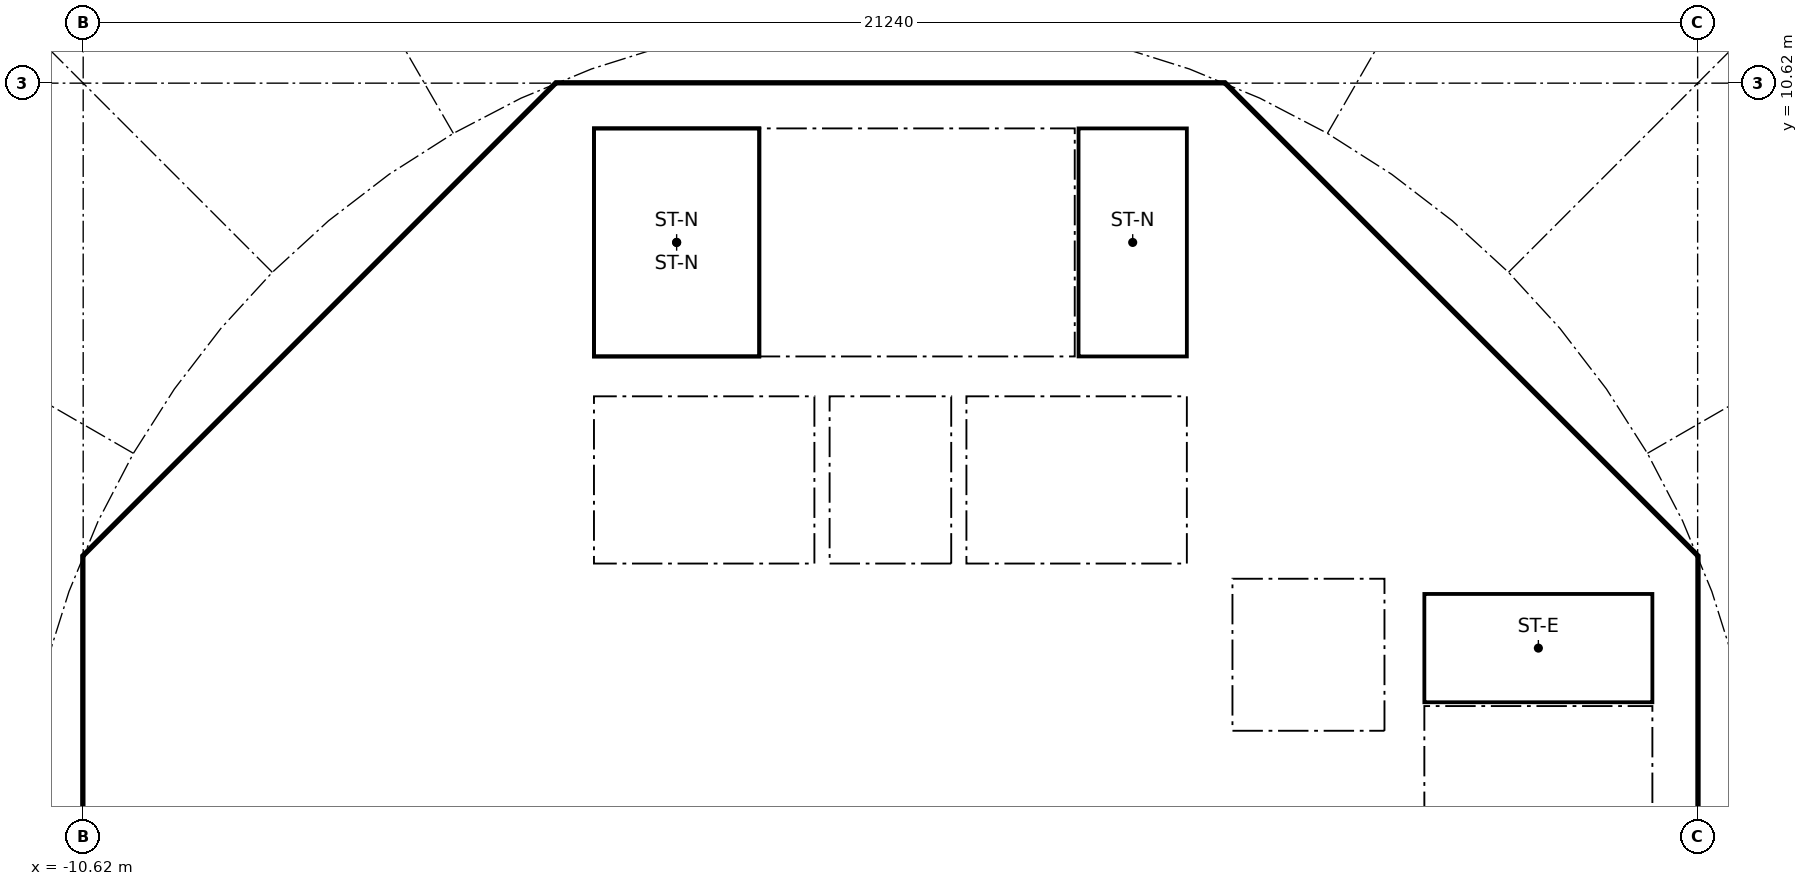
"""IFC4 building model, lengths in metres.
Left out: names, types, materials, properties, quantities, classifications, styles, units other than length and angle.
Written with IfcOpenShell. Run it as: python <this file> out.ifc"""

import sys

from ifc_helpers import new_model, si_unit, direction, frame, frame_2d, origin, place, context, subcontext, project, spatial, polyline, rectangle, outline, extrude, element, fill, save


model = new_model("IFC4")
c1 = context("Model", 3, precision=1e-05, world=origin(), true_north=direction((0.0, 1.0)))
c2 = subcontext(c1, "Body", "Model", "MODEL_VIEW")
j1 = project(units=[si_unit("LENGTHUNIT", "METRE"), si_unit("PLANEANGLEUNIT", "RADIAN")], contexts=[c1])
p1 = place(None, origin())
s1 = spatial("IfcSite", under=j1, at=p1, CompositionType="ELEMENT")
p2 = place(p1, origin())
s2 = spatial("IfcBuilding", under=s1, at=p2, CompositionType="ELEMENT")
p3 = place(p2, frame((0.0, 0.0, 299.2)))
s3 = spatial("IfcBuildingStorey", under=s2, at=p3, CompositionType="ELEMENT", Elevation=299.2)
p4 = place(p3, frame((9.988, 4.613, 0.0), z_axis=(0.0, 0.0, 1.0), x_axis=(-0.707106781187, 0.707106781187, 0.0)))
e1 = element("IfcWall", 1, at=p4, inside=s3, PredefinedType="SHEAR", context=c2, shape_type="SweptSolid", body=[
    extrude(rectangle(XDim=7.602, YDim=0.6, at=frame_2d((3.801, 0.0))), origin(), (0.0, 0.0, 1.0), 10.75),
])
p5 = place(p4, frame((3.201, 0.0, 0.0)))
e2 = element("IfcOpeningElement", 2, at=p5, cuts=e1, PredefinedType="OPENING", context=c2, shape_type="SweptSolid", body=[
    extrude(rectangle(XDim=1.2, YDim=2.1, at=frame_2d((0.6, 1.05))), frame((0.0, 0.31, 0.0), z_axis=(0.0, -1.0, 0.0), x_axis=(1.0, 0.0, 0.0)), (0.0, 0.0, 1.0), 0.62),
])
p6 = place(p3, frame((-4.613, 9.988, 0.0), z_axis=(0.0, 0.0, 1.0), x_axis=(-0.707106781187, -0.707106781187, 0.0)))
e3 = element("IfcWall", 3, at=p6, inside=s3, PredefinedType="SHEAR", context=c2, shape_type="SweptSolid", body=[
    extrude(rectangle(XDim=7.602, YDim=0.6, at=frame_2d((3.801, 0.0))), origin(), (0.0, 0.0, 1.0), 10.75),
])
p7 = place(p6, frame((0.351, 0.0, 0.0)))
e4 = element("IfcOpeningElement", 4, at=p7, cuts=e3, PredefinedType="OPENING", context=c2, shape_type="SweptSolid", body=[
    extrude(rectangle(XDim=1.1, YDim=2.1, at=frame_2d((0.55, 1.05))), frame((0.0, 0.31, 0.0), z_axis=(0.0, -1.0, 0.0), x_axis=(1.0, 0.0, 0.0)), (0.0, 0.0, 1.0), 0.62),
])
p8 = place(p3, frame((-10.325, 3.801, 0.0), z_axis=(0.0, 0.0, 1.0), x_axis=(0.0, -1.0, 0.0)))
e5 = element("IfcWall", 5, at=p8, inside=s3, PredefinedType="SHEAR", context=c2, shape_type="SweptSolid", body=[
    extrude(rectangle(XDim=7.602, YDim=0.6, at=frame_2d((3.801, 0.0))), origin(), (0.0, 0.0, 1.0), 10.75),
])
p9 = place(p8, frame((0.651, 0.0, 0.0)))
e6 = element("IfcOpeningElement", 6, at=p9, cuts=e5, PredefinedType="OPENING", context=c2, shape_type="SweptSolid", body=[
    extrude(rectangle(XDim=1.5, YDim=2.1, at=frame_2d((0.75, 1.05))), frame((0.0, 0.31, 0.0), z_axis=(0.0, -1.0, 0.0), x_axis=(1.0, 0.0, 0.0)), (0.0, 0.0, 1.0), 0.62),
])
p10 = place(p8, frame((5.451, 0.0, 0.0)))
e7 = element("IfcOpeningElement", 7, at=p10, cuts=e5, PredefinedType="OPENING", context=c2, shape_type="SweptSolid", body=[
    extrude(rectangle(XDim=1.5, YDim=2.1, at=frame_2d((0.75, 1.05))), frame((0.0, 0.31, 0.0), z_axis=(0.0, -1.0, 0.0), x_axis=(1.0, 0.0, 0.0)), (0.0, 0.0, 1.0), 0.62),
])
p11 = place(p3, frame((-7.0, 4.1, 0.0), z_axis=(0.0, 0.0, 1.0), x_axis=(0.0, 1.0, 0.0)))
e8 = element("IfcWall", 8, at=p11, inside=s3, PredefinedType="PARTITIONING", context=c2, shape_type="SweptSolid", body=[
    extrude(rectangle(XDim=2.927, YDim=0.15, at=frame_2d((1.463, 0.0))), origin(), (0.0, 0.0, 1.0), 10.75),
])
p12 = place(p11, frame((1.051, 0.0, 0.0)))
e9 = element("IfcOpeningElement", 9, at=p12, cuts=e8, PredefinedType="OPENING", context=c2, shape_type="SweptSolid", body=[
    extrude(rectangle(XDim=0.9, YDim=2.1, at=frame_2d((0.45, 1.05))), frame((0.0, 0.085, 0.0), z_axis=(0.0, -1.0, 0.0), x_axis=(1.0, 0.0, 0.0)), (0.0, 0.0, 1.0), 0.17),
])
p13 = place(p3, frame((4.0, 4.3, 0.0), z_axis=(0.0, 0.0, 1.0), x_axis=(0.0, 1.0, 0.0)))
e10 = element("IfcWall", 10, at=p13, inside=s3, PredefinedType="SOLIDWALL", context=c2, shape_type="SweptSolid", body=[
    extrude(rectangle(XDim=2.2, YDim=0.2, at=frame_2d((1.1, 0.0))), origin(), (0.0, 0.0, 1.0), 10.75),
])
p14 = place(p13, frame((0.55, 0.0, 0.0)))
e11 = element("IfcOpeningElement", 11, at=p14, cuts=e10, PredefinedType="OPENING", context=c2, shape_type="SweptSolid", body=[
    extrude(rectangle(XDim=1.1, YDim=2.1, at=frame_2d((0.55, 1.05))), frame((0.0, 0.11, 0.0), z_axis=(0.0, -1.0, 0.0), x_axis=(1.0, 0.0, 0.0)), (0.0, 0.0, 1.0), 0.22),
])
p15 = place(p3, frame((-4.0, 4.3, 0.0), z_axis=(0.0, 0.0, 1.0), x_axis=(0.0, 1.0, 0.0)))
e12 = element("IfcWall", 12, at=p15, inside=s3, PredefinedType="SOLIDWALL", context=c2, shape_type="SweptSolid", body=[
    extrude(rectangle(XDim=2.2, YDim=0.2, at=frame_2d((1.1, 0.0))), origin(), (0.0, 0.0, 1.0), 10.75),
])
p16 = place(p15, frame((0.55, 0.0, 0.0)))
e13 = element("IfcOpeningElement", 13, at=p16, cuts=e12, PredefinedType="OPENING", context=c2, shape_type="SweptSolid", body=[
    extrude(rectangle(XDim=1.1, YDim=2.1, at=frame_2d((0.55, 1.05))), frame((0.0, 0.11, 0.0), z_axis=(0.0, -1.0, 0.0), x_axis=(1.0, 0.0, 0.0)), (0.0, 0.0, 1.0), 0.22),
])
p17 = place(p3, frame((-6.7, 2.0, 0.0), z_axis=(0.0, 0.0, 1.0), x_axis=(1.0, 0.0, 0.0)))
e14 = element("IfcWall", 14, at=p17, inside=s3, PredefinedType="SOLIDWALL", context=c2, shape_type="SweptSolid", body=[
    extrude(rectangle(XDim=13.4, YDim=0.2, at=frame_2d((6.7, 0.0))), origin(), (0.0, 0.0, 1.0), 10.75),
])
p18 = place(p17, frame((11.65, 0.0, 0.0)))
e15 = element("IfcOpeningElement", 15, at=p18, cuts=e14, PredefinedType="OPENING", context=c2, shape_type="SweptSolid", body=[
    extrude(rectangle(XDim=1.1, YDim=2.1, at=frame_2d((0.55, 1.05))), frame((0.0, 0.11, 0.0), z_axis=(0.0, -1.0, 0.0), x_axis=(1.0, 0.0, 0.0)), (0.0, 0.0, 1.0), 0.22),
])
p19 = place(p17, frame((0.75, 0.0, 0.0)))
e16 = element("IfcOpeningElement", 16, at=p19, cuts=e14, PredefinedType="OPENING", context=c2, shape_type="SweptSolid", body=[
    extrude(rectangle(XDim=0.9, YDim=2.1, at=frame_2d((0.45, 1.05))), frame((0.0, 0.11, 0.0), z_axis=(0.0, -1.0, 0.0), x_axis=(1.0, 0.0, 0.0)), (0.0, 0.0, 1.0), 0.22),
])
p20 = place(p17, frame((4.05, 0.0, 0.0)))
e17 = element("IfcOpeningElement", 17, at=p20, cuts=e14, PredefinedType="OPENING", context=c2, shape_type="SweptSolid", body=[
    extrude(rectangle(XDim=0.9, YDim=2.1, at=frame_2d((0.45, 1.05))), frame((0.0, 0.11, 0.0), z_axis=(0.0, -1.0, 0.0), x_axis=(1.0, 0.0, 0.0)), (0.0, 0.0, 1.0), 0.22),
])
p21 = place(p17, frame((7.35, 0.0, 0.0)))
e18 = element("IfcOpeningElement", 18, at=p21, cuts=e14, PredefinedType="OPENING", context=c2, shape_type="SweptSolid", body=[
    extrude(rectangle(XDim=0.9, YDim=2.1, at=frame_2d((0.45, 1.05))), frame((0.0, 0.11, 0.0), z_axis=(0.0, -1.0, 0.0), x_axis=(1.0, 0.0, 0.0)), (0.0, 0.0, 1.0), 0.22),
])
p22 = place(p17, frame((9.55, 0.0, 0.0)))
e19 = element("IfcOpeningElement", 19, at=p22, cuts=e14, PredefinedType="OPENING", context=c2, shape_type="SweptSolid", body=[
    extrude(rectangle(XDim=0.9, YDim=2.1, at=frame_2d((0.45, 1.05))), frame((0.0, 0.11, 0.0), z_axis=(0.0, -1.0, 0.0), x_axis=(1.0, 0.0, 0.0)), (0.0, 0.0, 1.0), 0.22),
])
p23 = place(p3, frame((6.7, 4.0, 0.0), z_axis=(0.0, 0.0, 1.0), x_axis=(1.0, 0.0, 0.0)))
e20 = element("IfcWall", 20, at=p23, inside=s3, PredefinedType="SOLIDWALL", context=c2, shape_type="SweptSolid", body=[
    extrude(rectangle(XDim=3.325, YDim=0.2, at=frame_2d((1.662, 0.0))), origin(), (0.0, 0.0, 1.0), 10.75),
])
p24 = place(p23, frame((1.25, 0.0, 0.0)))
e21 = element("IfcOpeningElement", 21, at=p24, cuts=e20, PredefinedType="OPENING", context=c2, shape_type="SweptSolid", body=[
    extrude(rectangle(XDim=1.1, YDim=2.1, at=frame_2d((0.55, 1.05))), frame((0.0, 0.11, 0.0), z_axis=(0.0, -1.0, 0.0), x_axis=(1.0, 0.0, 0.0)), (0.0, 0.0, 1.0), 0.22),
])
p25 = place(p3, frame((4.0, 7.025, 0.0), z_axis=(0.0, 0.0, 1.0), x_axis=(0.0, 1.0, 0.0)))
e22 = element("IfcWall", 22, at=p25, inside=s3, PredefinedType="SOLIDWALL", context=c2, shape_type="SweptSolid", body=[
    extrude(rectangle(XDim=3.0, YDim=0.2, at=frame_2d((1.5, 0.0))), origin(), (0.0, 0.0, 1.0), 10.75),
])
p26 = place(p25, frame((0.925, 0.0, 0.0)))
e23 = element("IfcOpeningElement", 23, at=p26, cuts=e22, PredefinedType="OPENING", context=c2, shape_type="SweptSolid", body=[
    extrude(rectangle(XDim=1.1, YDim=2.1, at=frame_2d((0.55, 1.05))), frame((0.0, 0.11, 0.0), z_axis=(0.0, -1.0, 0.0), x_axis=(1.0, 0.0, 0.0)), (0.0, 0.0, 1.0), 0.22),
])
p27 = place(p3, origin())
e24 = element("IfcWall", 24, at=p27, inside=s3, PredefinedType="SHEAR", context=c2, shape_type="SweptSolid", body=[
    extrude(outline(polyline([(-10.2, 4.825), (-9.776, 4.401), (-10.025, 4.152), (-10.025, 3.801), (-10.625, 3.801), (-10.625, 4.401), (-10.2, 4.825)])), origin(), (0.0, 0.0, 1.0), 10.75),
])
p28 = place(p3, origin())
e25 = element("IfcWall", 25, at=p28, inside=s3, PredefinedType="SHEAR", context=c2, shape_type="SweptSolid", body=[
    extrude(outline(polyline([(-4.152, 10.025), (-4.401, 9.776), (-4.825, 10.2), (-4.401, 10.625), (4.401, 10.625), (4.825, 10.2), (4.401, 9.776), (4.152, 10.025), (-4.152, 10.025)])), origin(), (0.0, 0.0, 1.0), 10.75),
])
p29 = place(p3, origin())
e26 = element("IfcWall", 26, at=p29, inside=s3, PredefinedType="SHEAR", context=c2, shape_type="SweptSolid", body=[
    extrude(outline(polyline([(9.776, -4.401), (10.025, -4.152), (10.025, -3.801), (10.025, 4.152), (9.776, 4.401), (10.2, 4.825), (10.625, 4.401), (10.625, -4.401), (10.2, -4.825), (9.776, -4.401)])), origin(), (0.0, 0.0, 1.0), 10.75),
])
for number, where, z_axis, x_axis in (
    (27, (-0.9, 4.3, 0.0), (0.0, 0.0, 1.0), (0.0, 1.0, 0.0)),
    (28, (0.9, 4.3, 0.0), (0.0, 0.0, 1.0), (0.0, 1.0, 0.0)),
):
    element("IfcWall", number, at=place(p3, frame(where, z_axis=z_axis, x_axis=x_axis)), inside=s3, PredefinedType="SOLIDWALL", context=c2, shape_type="SweptSolid", body=[
        extrude(rectangle(XDim=2.2, YDim=0.2, at=frame_2d((1.1, 0.0))), origin(), (0.0, 0.0, 1.0), 10.75),
    ])
p30 = place(p3, origin())
e29 = element("IfcWall", 29, at=p30, inside=s3, PredefinedType="SOLIDWALL", context=c2, shape_type="SweptSolid", body=[
    extrude(outline(polyline([(-6.7, 4.3), (6.7, 4.3), (6.7, 2.1), (6.5, 2.1), (6.5, 4.1), (4.5, 4.1), (4.5, 2.1), (4.3, 2.1), (4.3, 4.1), (2.3, 4.1), (2.3, 2.1), (2.1, 2.1), (2.1, 4.1), (0.1, 4.1), (0.1, 2.1), (-0.1, 2.1), (-0.1, 4.1), (-4.3, 4.1), (-4.3, 2.1), (-4.5, 2.1), (-4.5, 4.1), (-6.5, 4.1), (-6.5, 2.1), (-6.7, 2.1), (-6.7, 4.3)])), origin(), (0.0, 0.0, 1.0), 10.75),
])
p31 = place(p3, frame((-10.025, 4.0, 0.0), z_axis=(0.0, 0.0, 1.0), x_axis=(1.0, 0.0, 0.0)))
e30 = element("IfcWall", 30, at=p31, inside=s3, PredefinedType="PARTITIONING", context=c2, shape_type="SweptSolid", body=[
    extrude(rectangle(XDim=3.325, YDim=0.2, at=frame_2d((1.662, 0.0))), origin(), (0.0, 0.0, 1.0), 10.75),
])
p32 = place(p3, origin())
e31 = element("IfcWall", 31, at=p32, inside=s3, PredefinedType="SOLIDWALL", context=c2, shape_type="SweptSolid", body=[
    extrude(outline(polyline([(-3.9, 7.025), (-4.1, 7.025), (-4.1, 10.025), (-3.9, 10.025), (-3.9, 7.025)])), origin(), (0.0, 0.0, 1.0), 10.75),
])
p33 = place(p3, origin())
e32 = element("IfcWall", 32, at=p33, inside=s3, PredefinedType="SOLIDWALL", context=c2, shape_type="SweptSolid", body=[
    extrude(outline(polyline([(4.1, 6.5), (-4.1, 6.5), (-4.1, 7.025), (4.1, 7.025), (4.1, 6.5)])), origin(), (0.0, 0.0, 1.0), 10.75),
])
p34 = place(p3, origin())
e33 = element("IfcWall", 33, at=p34, inside=s3, PredefinedType="SOLIDWALL", context=c2, shape_type="SweptSolid", body=[
    extrude(outline(polyline([(7.025, -3.9), (6.7, -3.9), (6.7, 3.9), (7.025, 3.9), (7.025, -3.9)])), origin(), (0.0, 0.0, 1.0), 10.75),
])
p35 = place(p18, origin())
e34 = element("IfcDoor", 34, at=p35, inside=s3, OperationType="DOUBLE_DOOR_SLIDING", PredefinedType="DOOR", context=c2, shape_type="SweptSolid", body=[
    extrude(rectangle(XDim=1.1, YDim=2.1, at=frame_2d((0.55, 1.05))), frame((0.0, 0.025, 0.0), z_axis=(0.0, -1.0, 0.0), x_axis=(1.0, 0.0, 0.0)), (0.0, 0.0, 1.0), 0.05),
])
fill(e15, e34)
p36 = place(p14, origin())
e35 = element("IfcDoor", 35, at=p36, inside=s3, OperationType="DOUBLE_DOOR_SLIDING", PredefinedType="DOOR", context=c2, shape_type="SweptSolid", body=[
    extrude(rectangle(XDim=1.1, YDim=2.1, at=frame_2d((0.55, 1.05))), frame((0.0, 0.025, 0.0), z_axis=(0.0, -1.0, 0.0), x_axis=(1.0, 0.0, 0.0)), (0.0, 0.0, 1.0), 0.05),
])
fill(e11, e35)
p37 = place(p16, origin())
e36 = element("IfcDoor", 36, at=p37, inside=s3, OperationType="DOUBLE_DOOR_SLIDING", PredefinedType="DOOR", context=c2, shape_type="SweptSolid", body=[
    extrude(rectangle(XDim=1.1, YDim=2.1, at=frame_2d((0.55, 1.05))), frame((0.0, 0.025, 0.0), z_axis=(0.0, -1.0, 0.0), x_axis=(1.0, 0.0, 0.0)), (0.0, 0.0, 1.0), 0.05),
])
fill(e13, e36)
p38 = place(p24, frame((1.1, 0.0, 0.0), x_axis=(-1.0, 0.0, 0.0)))
e37 = element("IfcDoor", 37, at=p38, inside=s3, OperationType="SINGLE_SWING_LEFT", PredefinedType="DOOR", context=c2, shape_type="SweptSolid", body=[
    extrude(rectangle(XDim=1.1, YDim=2.1, at=frame_2d((0.55, 1.05))), frame((0.0, 0.025, 0.0), z_axis=(0.0, -1.0, 0.0), x_axis=(1.0, 0.0, 0.0)), (0.0, 0.0, 1.0), 0.05),
])
fill(e21, e37)
p39 = place(p26, origin())
e38 = element("IfcDoor", 38, at=p39, inside=s3, OperationType="SINGLE_SWING_RIGHT", PredefinedType="DOOR", context=c2, shape_type="SweptSolid", body=[
    extrude(rectangle(XDim=1.1, YDim=2.1, at=frame_2d((0.55, 1.05))), frame((0.0, 0.025, 0.0), z_axis=(0.0, -1.0, 0.0), x_axis=(1.0, 0.0, 0.0)), (0.0, 0.0, 1.0), 0.05),
])
fill(e23, e38)
p40 = place(p12, origin())
e39 = element("IfcDoor", 39, at=p40, inside=s3, OperationType="SINGLE_SWING_LEFT", PredefinedType="DOOR", context=c2, shape_type="SweptSolid", body=[
    extrude(rectangle(XDim=0.9, YDim=2.1, at=frame_2d((0.45, 1.05))), frame((0.0, 0.025, 0.0), z_axis=(0.0, -1.0, 0.0), x_axis=(1.0, 0.0, 0.0)), (0.0, 0.0, 1.0), 0.05),
])
fill(e9, e39)
p41 = place(p19, origin())
e40 = element("IfcDoor", 40, at=p41, inside=s3, OperationType="SINGLE_SWING_RIGHT", PredefinedType="DOOR", context=c2, shape_type="SweptSolid", body=[
    extrude(rectangle(XDim=0.9, YDim=2.1, at=frame_2d((0.45, 1.05))), frame((0.0, 0.025, 0.0), z_axis=(0.0, -1.0, 0.0), x_axis=(1.0, 0.0, 0.0)), (0.0, 0.0, 1.0), 0.05),
])
fill(e16, e40)
p42 = place(p20, origin())
e41 = element("IfcDoor", 41, at=p42, inside=s3, OperationType="SINGLE_SWING_RIGHT", PredefinedType="DOOR", context=c2, shape_type="SweptSolid", body=[
    extrude(rectangle(XDim=0.9, YDim=2.1, at=frame_2d((0.45, 1.05))), frame((0.0, 0.025, 0.0), z_axis=(0.0, -1.0, 0.0), x_axis=(1.0, 0.0, 0.0)), (0.0, 0.0, 1.0), 0.05),
])
fill(e17, e41)
p43 = place(p21, origin())
e42 = element("IfcDoor", 42, at=p43, inside=s3, OperationType="SINGLE_SWING_RIGHT", PredefinedType="DOOR", context=c2, shape_type="SweptSolid", body=[
    extrude(rectangle(XDim=0.9, YDim=2.1, at=frame_2d((0.45, 1.05))), frame((0.0, 0.025, 0.0), z_axis=(0.0, -1.0, 0.0), x_axis=(1.0, 0.0, 0.0)), (0.0, 0.0, 1.0), 0.05),
])
fill(e18, e42)
p44 = place(p22, origin())
e43 = element("IfcDoor", 43, at=p44, inside=s3, OperationType="SINGLE_SWING_LEFT", PredefinedType="DOOR", context=c2, shape_type="SweptSolid", body=[
    extrude(rectangle(XDim=0.9, YDim=2.1, at=frame_2d((0.45, 1.05))), frame((0.0, 0.025, 0.0), z_axis=(0.0, -1.0, 0.0), x_axis=(1.0, 0.0, 0.0)), (0.0, 0.0, 1.0), 0.05),
])
fill(e19, e43)
p45 = place(p5, origin())
e44 = element("IfcDoor", 44, at=p45, inside=s3, OperationType="SINGLE_SWING_LEFT", PredefinedType="DOOR", context=c2, shape_type="SweptSolid", body=[
    extrude(rectangle(XDim=1.2, YDim=2.1, at=frame_2d((0.6, 1.05))), frame((0.0, 0.025, 0.0), z_axis=(0.0, -1.0, 0.0), x_axis=(1.0, 0.0, 0.0)), (0.0, 0.0, 1.0), 0.05),
])
fill(e2, e44)
p46 = place(p9, origin())
e45 = element("IfcDoor", 45, at=p46, inside=s3, OperationType="DOUBLE_DOOR_SINGLE_SWING", PredefinedType="DOOR", context=c2, shape_type="SweptSolid", body=[
    extrude(rectangle(XDim=1.5, YDim=2.1, at=frame_2d((0.75, 1.05))), frame((0.0, 0.025, 0.0), z_axis=(0.0, -1.0, 0.0), x_axis=(1.0, 0.0, 0.0)), (0.0, 0.0, 1.0), 0.05),
])
fill(e6, e45)
p47 = place(p7, origin())
e46 = element("IfcDoor", 46, at=p47, inside=s3, OperationType="SINGLE_SWING_LEFT", PredefinedType="DOOR", context=c2, shape_type="SweptSolid", body=[
    extrude(rectangle(XDim=1.1, YDim=2.1, at=frame_2d((0.55, 1.05))), frame((0.0, 0.025, 0.0), z_axis=(0.0, -1.0, 0.0), x_axis=(1.0, 0.0, 0.0)), (0.0, 0.0, 1.0), 0.05),
])
fill(e4, e46)
save(model, sys.argv[1])
